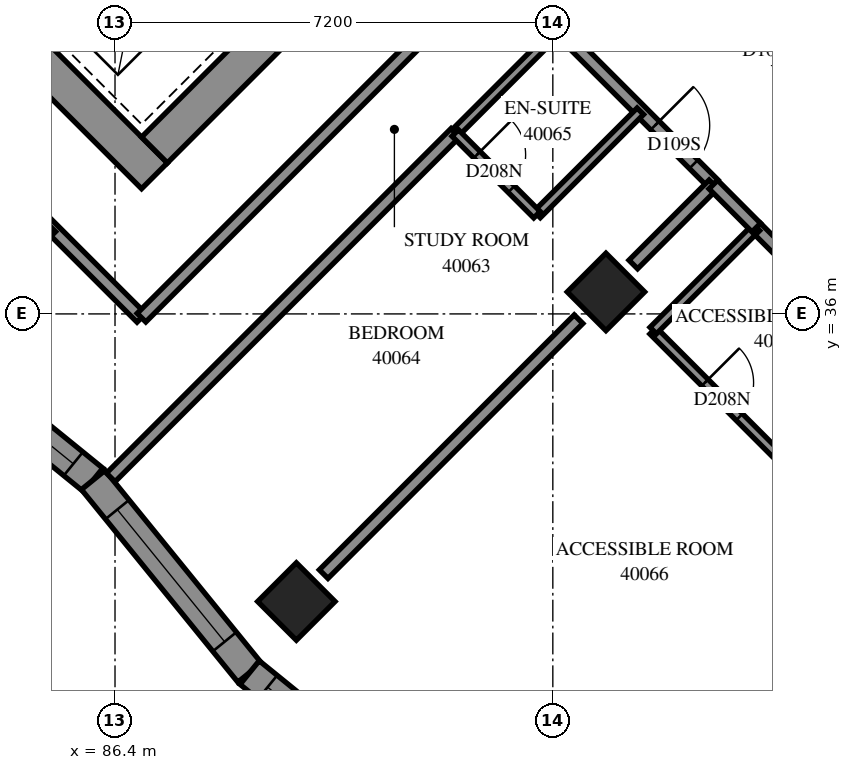
"""IFC4 building model, lengths in metres.
Left out: names, types, materials, properties, quantities, classifications, styles, units other than length and angle.
Written with IfcOpenShell. Run it as: python <this file> out.ifc"""

import sys

from ifc_helpers import new_model, si_unit, direction, frame, frame_2d, origin, origin_2d, place, context, subcontext, project, spatial, polyline, rectangle, outline, extrude, element, fill, save


model = new_model("IFC4")
c1 = context("Model", 3, precision=1e-05, world=origin(), true_north=direction((0.0, 1.0)))
c2 = subcontext(c1, "Body", "Model", "MODEL_VIEW")
j1 = project(units=[si_unit("LENGTHUNIT", "METRE"), si_unit("PLANEANGLEUNIT", "RADIAN")], contexts=[c1])
p1 = place(None, origin())
s1 = spatial("IfcSite", under=j1, at=p1, CompositionType="ELEMENT")
p2 = place(p1, origin())
s2 = spatial("IfcBuilding", under=s1, at=p2, CompositionType="ELEMENT")
p3 = place(p2, frame((0.0, 0.0, 149.0)))
s3 = spatial("IfcBuildingStorey", under=s2, at=p3, CompositionType="ELEMENT", Elevation=149.0)
for number, where, z_axis, x_axis in (
    (1, (94.474, 36.362, 0.0), (0.0, 0.0, 1.0), (0.707, -0.707, 0.0)),
    (2, (89.382, 31.271, 0.0), (0.0, 0.0, 1.0), (0.707, -0.707, 0.0)),
):
    element("IfcColumn", number, at=place(p3, frame(where, z_axis=z_axis, x_axis=x_axis)), inside=s3, PredefinedType="COLUMN", context=c2, shape_type="SweptSolid", body=[
        extrude(rectangle(XDim=0.9, YDim=0.9, at=origin_2d()), origin(), (0.0, 0.0, 1.0), 3.1),
    ])
p4 = place(p3, frame((76.018, 49.302, -0.3), z_axis=(0.0, 0.0, 1.0), x_axis=(0.7071067812, -0.7071067812, 0.0)))
e3 = element("IfcWall", 3, at=p4, inside=s3, PredefinedType="SHEAR", context=c2, shape_type="SweptSolid", body=[
    extrude(rectangle(XDim=15.6, YDim=0.6, at=frame_2d((7.8, 0.0))), origin(), (0.0, 0.0, 1.0), 2.7),
])
p5 = place(p3, frame((87.049, 38.695, -0.3), z_axis=(0.0, 0.0, 1.0), x_axis=(0.7071067812, 0.7071067812, 0.0)))
e4 = element("IfcWall", 4, at=p5, inside=s3, PredefinedType="SHEAR", context=c2, shape_type="SweptSolid", body=[
    extrude(rectangle(XDim=14.4, YDim=0.6, at=frame_2d((7.2, 0.0))), origin(), (0.0, 0.0, 1.0), 2.7),
])
p6 = place(p5, frame((4.55, 0.0, 0.3)))
e5 = element("IfcOpeningElement", 5, at=p6, cuts=e4, PredefinedType="OPENING", context=c2, shape_type="SweptSolid", body=[
    extrude(rectangle(XDim=1.1, YDim=2.1, at=frame_2d((0.55, 1.05))), frame((0.0, 0.31, 0.0), z_axis=(0.0, -1.0, 0.0), x_axis=(1.0, 0.0, 0.0)), (0.0, 0.0, 1.0), 0.62),
])
p7 = place(p5, frame((11.35, 0.0, 0.3)))
e6 = element("IfcOpeningElement", 6, at=p7, cuts=e4, PredefinedType="OPENING", context=c2, shape_type="SweptSolid", body=[
    extrude(rectangle(XDim=1.1, YDim=2.1, at=frame_2d((0.55, 1.05))), frame((0.0, 0.31, 0.0), z_axis=(0.0, -1.0, 0.0), x_axis=(1.0, 0.0, 0.0)), (0.0, 0.0, 1.0), 0.62),
])
p8 = place(p3, frame((82.874, 35.842, 0.0), z_axis=(0.0, 0.0, 1.0), x_axis=(0.7762833982, -0.6303840779, 0.0)))
e7 = element("IfcWall", 7, at=p8, inside=s3, PredefinedType="SOLIDWALL", context=c2, shape_type="SweptSolid", body=[
    extrude(outline(polyline([(-0.026, -0.25), (4.054, -0.25), (4.106, 0.25), (0.026, 0.25), (-0.026, -0.25)])), origin(), (0.0, 0.0, 1.0), 3.1),
])
p9 = place(p8, frame((0.859, 0.0, 0.45)))
e8 = element("IfcOpeningElement", 8, at=p9, cuts=e7, PredefinedType="OPENING", context=c2, shape_type="SweptSolid", body=[
    extrude(rectangle(XDim=2.8, YDim=2.5, at=frame_2d((1.4, 1.25))), frame((0.0, 0.26, 0.0), z_axis=(0.0, -1.0, 0.0), x_axis=(1.0, 0.0, 0.0)), (0.0, 0.0, 1.0), 0.52),
])
p10 = place(p3, frame((86.042, 33.269, 0.0), z_axis=(0.0, 0.0, 1.0), x_axis=(0.6303840779, -0.7762833982, 0.0)))
e9 = element("IfcWall", 9, at=p10, inside=s3, PredefinedType="SOLIDWALL", context=c2, shape_type="SweptSolid", body=[
    extrude(outline(polyline([(0.026, -0.25), (4.106, -0.25), (4.054, 0.25), (-0.026, 0.25), (0.026, -0.25)])), origin(), (0.0, 0.0, 1.0), 3.1),
])
p11 = place(p10, frame((0.627, 0.0, 0.45)))
e10 = element("IfcOpeningElement", 10, at=p11, cuts=e9, PredefinedType="OPENING", context=c2, shape_type="SweptSolid", body=[
    extrude(rectangle(XDim=2.8, YDim=2.5, at=frame_2d((1.4, 1.25))), frame((0.0, 0.26, 0.0), z_axis=(0.0, -1.0, 0.0), x_axis=(1.0, 0.0, 0.0)), (0.0, 0.0, 1.0), 0.52),
])
p12 = place(p3, frame((88.614, 30.102, 0.0), z_axis=(0.0, 0.0, 1.0), x_axis=(0.7762871195, -0.6303794952, 0.0)))
e11 = element("IfcWall", 11, at=p12, inside=s3, PredefinedType="SOLIDWALL", context=c2, shape_type="SweptSolid", body=[
    extrude(outline(polyline([(-0.026, -0.25), (4.054, -0.25), (4.143, 0.25), (0.026, 0.25), (-0.026, -0.25)])), origin(), (0.0, 0.0, 1.0), 3.1),
])
p13 = place(p12, frame((0.38, 0.0, 0.45)))
e12 = element("IfcOpeningElement", 12, at=p13, cuts=e11, PredefinedType="OPENING", context=c2, shape_type="SweptSolid", body=[
    extrude(rectangle(XDim=2.8, YDim=2.5, at=frame_2d((1.4, 1.25))), frame((0.0, 0.26, 0.0), z_axis=(0.0, -1.0, 0.0), x_axis=(1.0, 0.0, 0.0)), (0.0, 0.0, 1.0), 0.52),
])
p14 = place(p3, frame((94.189, 43.287, 0.0), z_axis=(0.0, 0.0, 1.0), x_axis=(0.7071067812, -0.7071067812, 0.0)))
e13 = element("IfcWall", 13, at=p14, inside=s3, PredefinedType="PARTITIONING", context=c2, shape_type="SweptSolid", body=[
    extrude(rectangle(XDim=12.298, YDim=0.2, at=frame_2d((6.149, 0.0))), origin(), (0.0, 0.0, 1.0), 3.1),
])
p15 = place(p14, frame((3.755, 0.0, 0.0)))
e14 = element("IfcOpeningElement", 14, at=p15, cuts=e13, PredefinedType="OPENING", context=c2, shape_type="SweptSolid", body=[
    extrude(rectangle(XDim=0.9, YDim=2.1, at=frame_2d((0.45, 1.05))), frame((0.0, 0.11, 0.0), z_axis=(0.0, -1.0, 0.0), x_axis=(1.0, 0.0, 0.0)), (0.0, 0.0, 1.0), 0.22),
])
p16 = place(p14, frame((10.998, 0.0, 0.0)))
e15 = element("IfcOpeningElement", 15, at=p16, cuts=e13, PredefinedType="OPENING", context=c2, shape_type="SweptSolid", body=[
    extrude(rectangle(XDim=0.9, YDim=2.1, at=frame_2d((0.45, 1.05))), frame((0.0, 0.11, 0.0), z_axis=(0.0, -1.0, 0.0), x_axis=(1.0, 0.0, 0.0)), (0.0, 0.0, 1.0), 0.22),
])
p17 = place(p3, frame((80.899, 41.869, 0.0), z_axis=(0.0, 0.0, 1.0), x_axis=(0.7071067812, -0.7071067812, 0.0)))
e16 = element("IfcWall", 16, at=p17, inside=s3, PredefinedType="PARTITIONING", context=c2, shape_type="SweptSolid", body=[
    extrude(rectangle(XDim=8.392, YDim=0.2, at=frame_2d((4.196, 0.0))), origin(), (0.0, 0.0, 1.0), 3.1),
])
p18 = place(p17, frame((4.988, 0.0, 0.0)))
e17 = element("IfcOpeningElement", 17, at=p18, cuts=e16, PredefinedType="OPENING", context=c2, shape_type="SweptSolid", body=[
    extrude(rectangle(XDim=0.9, YDim=2.1, at=frame_2d((0.45, 1.05))), frame((0.0, 0.11, 0.0), z_axis=(0.0, -1.0, 0.0), x_axis=(1.0, 0.0, 0.0)), (0.0, 0.0, 1.0), 0.22),
])
p19 = place(p3, frame((86.836, 35.938, 0.0), z_axis=(0.0, 0.0, 1.0), x_axis=(0.7071067812, 0.7071067812, 0.0)))
e18 = element("IfcWall", 18, at=p19, inside=s3, PredefinedType="PARTITIONING", context=c2, shape_type="SweptSolid", body=[
    extrude(rectangle(XDim=8.2, YDim=0.2, at=frame_2d((4.1, 0.0))), origin(), (0.0, 0.0, 1.0), 3.1),
])
p20 = place(p3, frame((86.33, 33.311, 0.0), z_axis=(0.0, 0.0, 1.0), x_axis=(0.7071005427, 0.7071130196, 0.0)))
e19 = element("IfcWall", 19, at=p20, inside=s3, PredefinedType="PARTITIONING", context=c2, shape_type="SweptSolid", body=[
    extrude(rectangle(XDim=8.015, YDim=0.2, at=frame_2d((4.007, 0.0))), origin(), (0.0, 0.0, 1.0), 3.1),
])
p21 = place(p3, frame((89.831, 31.721, 0.0), z_axis=(0.0, 0.0, 1.0), x_axis=(0.7071067812, 0.7071067812, 0.0)))
e20 = element("IfcWall", 20, at=p21, inside=s3, PredefinedType="PARTITIONING", context=c2, shape_type="SweptSolid", body=[
    extrude(rectangle(XDim=5.928, YDim=0.2, at=frame_2d((2.964, 0.0))), origin(), (0.0, 0.0, 1.0), 3.1),
])
p22 = place(p3, frame((94.923, 26.631, 0.0), z_axis=(0.0, 0.0, 1.0), x_axis=(0.7071067812, 0.7071067812, 0.0)))
e21 = element("IfcWall", 21, at=p22, inside=s3, PredefinedType="PARTITIONING", context=c2, shape_type="SweptSolid", body=[
    extrude(rectangle(XDim=5.926, YDim=0.2, at=frame_2d((2.963, 0.0))), origin(), (0.0, 0.0, 1.0), 2.6),
])
p23 = place(p3, frame((92.639, 41.739, 0.0), z_axis=(0.0, 0.0, 1.0), x_axis=(0.7071067812, -0.7071067812, 0.0)))
e22 = element("IfcWall", 22, at=p23, inside=s3, PredefinedType="PARTITIONING", context=c2, shape_type="SweptSolid", body=[
    extrude(rectangle(XDim=5.1, YDim=0.2, at=frame_2d((2.55, 0.0))), origin(), (0.0, 0.0, 1.0), 3.1),
])
p24 = place(p23, frame((0.123, 0.0, 0.0)))
e23 = element("IfcOpeningElement", 23, at=p24, cuts=e22, PredefinedType="OPENING", context=c2, shape_type="SweptSolid", body=[
    extrude(rectangle(XDim=1.0, YDim=2.1, at=frame_2d((0.5, 1.05))), frame((0.0, 0.11, 0.0), z_axis=(0.0, -1.0, 0.0), x_axis=(1.0, 0.0, 0.0)), (0.0, 0.0, 1.0), 0.22),
])
p25 = place(p23, frame((3.734, 0.0, 0.0)))
e24 = element("IfcOpeningElement", 24, at=p25, cuts=e22, PredefinedType="OPENING", context=c2, shape_type="SweptSolid", body=[
    extrude(rectangle(XDim=0.9, YDim=2.1, at=frame_2d((0.45, 1.05))), frame((0.0, 0.11, 0.0), z_axis=(0.0, -1.0, 0.0), x_axis=(1.0, 0.0, 0.0)), (0.0, 0.0, 1.0), 0.22),
])
p26 = place(p3, frame((95.249, 35.723, 0.0), z_axis=(0.0, 0.0, 1.0), x_axis=(0.7067942478, -0.7074191764, 0.0)))
e25 = element("IfcWall", 25, at=p26, inside=s3, PredefinedType="PARTITIONING", context=c2, shape_type="SweptSolid", body=[
    extrude(rectangle(XDim=3.2, YDim=0.15, at=frame_2d((1.6, 0.0))), origin(), (0.0, 0.0, 1.0), 3.1),
])
p27 = place(p26, frame((1.206, 0.0, 0.0)))
e26 = element("IfcOpeningElement", 26, at=p27, cuts=e25, PredefinedType="OPENING", context=c2, shape_type="SweptSolid", body=[
    extrude(rectangle(XDim=0.8, YDim=2.1, at=frame_2d((0.4, 1.05))), frame((0.0, 0.085, 0.0), z_axis=(0.0, -1.0, 0.0), x_axis=(1.0, 0.0, 0.0)), (0.0, 0.0, 1.0), 0.17),
])
p28 = place(p3, frame((96.945, 37.419, 0.0), z_axis=(0.0, 0.0, 1.0), x_axis=(0.7071067812, -0.7071067812, 0.0)))
e27 = element("IfcWall", 27, at=p28, inside=s3, PredefinedType="PARTITIONING", context=c2, shape_type="SweptSolid", body=[
    extrude(rectangle(XDim=2.927, YDim=0.2, at=frame_2d((1.464, 0.0))), origin(), (0.0, 0.0, 1.0), 3.1),
])
for number, where, z_axis, x_axis in (
    (28, (93.341, 37.635, 0.0), (0.0, 0.0, 1.0), (0.707, 0.707, 0.0)),
    (29, (91.997, 38.979, 0.0), (0.0, 0.0, 1.0), (0.707, 0.707, 0.0)),
):
    element("IfcWall", number, at=place(p3, frame(where, z_axis=z_axis, x_axis=x_axis)), inside=s3, PredefinedType="PARTITIONING", context=c2, shape_type="SweptSolid", body=[
        extrude(rectangle(XDim=2.401, YDim=0.15, at=frame_2d((1.201, 0.0))), origin(), (0.0, 0.0, 1.0), 3.1),
    ])
p29 = place(p3, frame((95.251, 35.727, 0.0), z_axis=(0.0, 0.0, 1.0), x_axis=(0.7071067812, 0.7071067812, 0.0)))
e30 = element("IfcWall", 30, at=p29, inside=s3, PredefinedType="PARTITIONING", context=c2, shape_type="SweptSolid", body=[
    extrude(rectangle(XDim=2.398, YDim=0.15, at=frame_2d((1.199, 0.0))), origin(), (0.0, 0.0, 1.0), 3.1),
])
p30 = place(p3, frame((91.995, 38.975, 0.0), z_axis=(0.0, 0.0, 1.0), x_axis=(0.7071067812, -0.7071067812, 0.0)))
e31 = element("IfcWall", 31, at=p30, inside=s3, PredefinedType="PARTITIONING", context=c2, shape_type="SweptSolid", body=[
    extrude(rectangle(XDim=1.901, YDim=0.15, at=frame_2d((0.95, 0.0))), origin(), (0.0, 0.0, 1.0), 3.1),
])
p31 = place(p30, frame((0.506, 0.0, 0.0)))
e32 = element("IfcOpeningElement", 32, at=p31, cuts=e31, PredefinedType="OPENING", context=c2, shape_type="SweptSolid", body=[
    extrude(rectangle(XDim=0.8, YDim=2.1, at=frame_2d((0.4, 1.05))), frame((0.0, 0.085, 0.0), z_axis=(0.0, -1.0, 0.0), x_axis=(1.0, 0.0, 0.0)), (0.0, 0.0, 1.0), 0.17),
])
p32 = place(p3, frame((94.923, 36.813, 0.0), z_axis=(0.0, 0.0, 1.0), x_axis=(0.7071067812, 0.7071067812, 0.0)))
e33 = element("IfcWall", 33, at=p32, inside=s3, PredefinedType="PARTITIONING", context=c2, shape_type="SweptSolid", body=[
    extrude(rectangle(XDim=1.864, YDim=0.2, at=frame_2d((0.932, 0.0))), origin(), (0.0, 0.0, 1.0), 3.1),
])
p33 = place(p3, frame((96.24, 38.128, 0.0), z_axis=(0.0, 0.0, 1.0), x_axis=(0.7061059238, -0.7081062239, 0.0)))
e34 = element("IfcWall", 34, at=p33, inside=s3, PredefinedType="PARTITIONING", context=c2, shape_type="SweptSolid", body=[
    extrude(rectangle(XDim=1.0, YDim=0.2, at=frame_2d((0.5, 0.0))), origin(), (0.0, 0.0, 1.0), 3.1),
])
p34 = place(p3, frame((84.741, 36.813, 0.0), z_axis=(0.0, 0.0, 1.0), x_axis=(0.7071067812, 0.7071067812, 0.0)))
e35 = element("IfcWall", 35, at=p34, inside=s3, PredefinedType="PARTITIONING", context=c2, shape_type="SweptSolid", body=[
    extrude(rectangle(XDim=0.863, YDim=0.2, at=frame_2d((0.431, 0.0))), origin(), (0.0, 0.0, 1.0), 3.1),
])
p35 = place(p9, origin())
e36 = element("IfcWindow", 36, at=p35, inside=s3, PartitioningType="SINGLE_PANEL", PredefinedType="WINDOW", context=c2, shape_type="SweptSolid", body=[
    extrude(rectangle(XDim=2.8, YDim=2.5, at=frame_2d((1.4, 1.25))), frame((0.0, 0.18, 0.0), z_axis=(0.0, -1.0, 0.0), x_axis=(1.0, 0.0, 0.0)), (0.0, 0.0, 1.0), 0.06),
])
fill(e8, e36)
p36 = place(p11, origin())
e37 = element("IfcWindow", 37, at=p36, inside=s3, PartitioningType="SINGLE_PANEL", PredefinedType="WINDOW", context=c2, shape_type="SweptSolid", body=[
    extrude(rectangle(XDim=2.8, YDim=2.5, at=frame_2d((1.4, 1.25))), frame((0.0, 0.18, 0.0), z_axis=(0.0, -1.0, 0.0), x_axis=(1.0, 0.0, 0.0)), (0.0, 0.0, 1.0), 0.06),
])
fill(e10, e37)
p37 = place(p13, origin())
e38 = element("IfcWindow", 38, at=p37, inside=s3, PartitioningType="SINGLE_PANEL", PredefinedType="WINDOW", context=c2, shape_type="SweptSolid", body=[
    extrude(rectangle(XDim=2.8, YDim=2.5, at=frame_2d((1.4, 1.25))), frame((0.0, 0.18, 0.0), z_axis=(0.0, -1.0, 0.0), x_axis=(1.0, 0.0, 0.0)), (0.0, 0.0, 1.0), 0.06),
])
fill(e12, e38)
p38 = place(p15, origin())
e39 = element("IfcDoor", 39, at=p38, inside=s3, OperationType="SINGLE_SWING_RIGHT", PredefinedType="DOOR", context=c2, shape_type="SweptSolid", body=[
    extrude(rectangle(XDim=0.9, YDim=2.1, at=frame_2d((0.45, 1.05))), frame((0.0, 0.025, 0.0), z_axis=(0.0, -1.0, 0.0), x_axis=(1.0, 0.0, 0.0)), (0.0, 0.0, 1.0), 0.05),
])
fill(e14, e39)
p39 = place(p25, origin())
e40 = element("IfcDoor", 40, at=p39, inside=s3, OperationType="SINGLE_SWING_LEFT", PredefinedType="DOOR", context=c2, shape_type="SweptSolid", body=[
    extrude(rectangle(XDim=0.9, YDim=2.1, at=frame_2d((0.45, 1.05))), frame((0.0, 0.025, 0.0), z_axis=(0.0, -1.0, 0.0), x_axis=(1.0, 0.0, 0.0)), (0.0, 0.0, 1.0), 0.05),
])
fill(e24, e40)
p40 = place(p31, origin())
e41 = element("IfcDoor", 41, at=p40, inside=s3, OperationType="SINGLE_SWING_RIGHT", PredefinedType="DOOR", context=c2, shape_type="SweptSolid", body=[
    extrude(rectangle(XDim=0.8, YDim=2.1, at=frame_2d((0.4, 1.05))), frame((0.0, 0.025, 0.0), z_axis=(0.0, -1.0, 0.0), x_axis=(1.0, 0.0, 0.0)), (0.0, 0.0, 1.0), 0.05),
])
fill(e32, e41)
p41 = place(p27, origin())
e42 = element("IfcDoor", 42, at=p41, inside=s3, OperationType="SINGLE_SWING_RIGHT", PredefinedType="DOOR", context=c2, shape_type="SweptSolid", body=[
    extrude(rectangle(XDim=0.8, YDim=2.1, at=frame_2d((0.4, 1.05))), frame((0.0, 0.025, 0.0), z_axis=(0.0, -1.0, 0.0), x_axis=(1.0, 0.0, 0.0)), (0.0, 0.0, 1.0), 0.05),
])
fill(e26, e42)
save(model, sys.argv[1])
